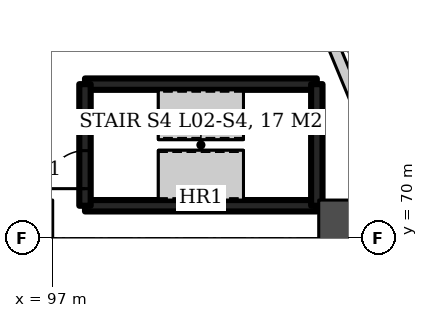
"""IFC4 building model, lengths in metres.
Left out: names, types, materials, properties, quantities, classifications, styles, units other than length and angle.
Written with IfcOpenShell. Run it as: python <this file> out.ifc"""

import sys

from ifc_helpers import new_model, si_unit, direction, frame, frame_2d, origin, origin_2d, place, context, subcontext, project, spatial, rectangle, extrude, element, fill, save


model = new_model("IFC4")
c1 = context("Model", 3, precision=1e-05, world=origin(), true_north=direction((0.0, 1.0)))
c2 = subcontext(c1, "Body", "Model", "MODEL_VIEW")
j1 = project(units=[si_unit("LENGTHUNIT", "METRE"), si_unit("PLANEANGLEUNIT", "RADIAN")], contexts=[c1])
p1 = place(None, origin())
s1 = spatial("IfcSite", under=j1, at=p1, CompositionType="ELEMENT")
p2 = place(p1, origin())
s2 = spatial("IfcBuilding", under=s1, at=p2, CompositionType="ELEMENT")
p3 = place(p2, frame((0.0, 0.0, 15.0)))
s3 = spatial("IfcBuildingStorey", under=s2, at=p3, CompositionType="ELEMENT", Elevation=15.0)
p4 = place(p3, frame((105.0, 70.0, 0.0), z_axis=(0.0, 0.0, 1.0), x_axis=(1.0, 0.0, 0.0)))
e1 = element("IfcColumn", 1, at=p4, inside=s3, PredefinedType="COLUMN", context=c2, shape_type="SweptSolid", body=[
    extrude(rectangle(XDim=2.0, YDim=2.0, at=origin_2d()), origin(), (0.0, 0.0, 1.0), 5.0),
])
p5 = place(p3, frame((105.335, 72.769, 0.0), z_axis=(0.0, 0.0, 1.0), x_axis=(-0.382709424419, 0.923868765822, 0.0)))
e2 = element("IfcWall", 2, at=p5, inside=s3, PredefinedType="SOLIDWALL", context=c2, shape_type="SweptSolid", body=[
    extrude(rectangle(XDim=2.793, YDim=0.3, at=frame_2d((1.397, 0.0))), origin(), (0.0, 0.0, 1.0), 4.7),
])
for number, where, z_axis, x_axis in (
    (3, (97.85, 70.85, 0.0), (0.0, 0.0, 1.0), (1.0, 0.0, 0.0)),
    (4, (97.85, 74.05, 0.0), (0.0, 0.0, 1.0), (1.0, 0.0, 0.0)),
):
    element("IfcWall", number, at=place(p3, frame(where, z_axis=z_axis, x_axis=x_axis)), inside=s3, PredefinedType="SHEAR", context=c2, shape_type="SweptSolid", body=[
        extrude(rectangle(XDim=6.1, YDim=0.3, at=frame_2d((3.05, 0.0))), origin(), (0.0, 0.0, 1.0), 5.0),
    ])
p6 = place(p3, frame((97.85, 70.85, 0.0), z_axis=(0.0, 0.0, 1.0), x_axis=(0.0, 1.0, 0.0)))
e5 = element("IfcWall", 5, at=p6, inside=s3, PredefinedType="SHEAR", context=c2, shape_type="SweptSolid", body=[
    extrude(rectangle(XDim=3.2, YDim=0.3, at=frame_2d((1.6, 0.0))), origin(), (0.0, 0.0, 1.0), 5.0),
])
p7 = place(p6, frame((0.45, 0.0, 0.0)))
e6 = element("IfcOpeningElement", 6, at=p7, cuts=e5, PredefinedType="OPENING", context=c2, shape_type="SweptSolid", body=[
    extrude(rectangle(XDim=1.0, YDim=2.1, at=frame_2d((0.5, 1.05))), frame((0.0, 0.16, 0.0), z_axis=(0.0, -1.0, 0.0), x_axis=(1.0, 0.0, 0.0)), (0.0, 0.0, 1.0), 0.32),
])
p8 = place(p3, frame((103.95, 70.85, 0.0), z_axis=(0.0, 0.0, 1.0), x_axis=(0.0, 1.0, 0.0)))
e7 = element("IfcWall", 7, at=p8, inside=s3, PredefinedType="SHEAR", context=c2, shape_type="SweptSolid", body=[
    extrude(rectangle(XDim=3.2, YDim=0.3, at=frame_2d((1.6, 0.0))), origin(), (0.0, 0.0, 1.0), 5.0),
])
p9 = place(p7, origin())
e8 = element("IfcDoor", 8, at=p9, inside=s3, OperationType="SINGLE_SWING_LEFT", PredefinedType="DOOR", context=c2, shape_type="SweptSolid", body=[
    extrude(rectangle(XDim=1.0, YDim=2.1, at=frame_2d((0.5, 1.05))), frame((0.0, 0.025, 0.0), z_axis=(0.0, -1.0, 0.0), x_axis=(1.0, 0.0, 0.0)), (0.0, 0.0, 1.0), 0.05),
])
fill(e6, e8)
save(model, sys.argv[1])
